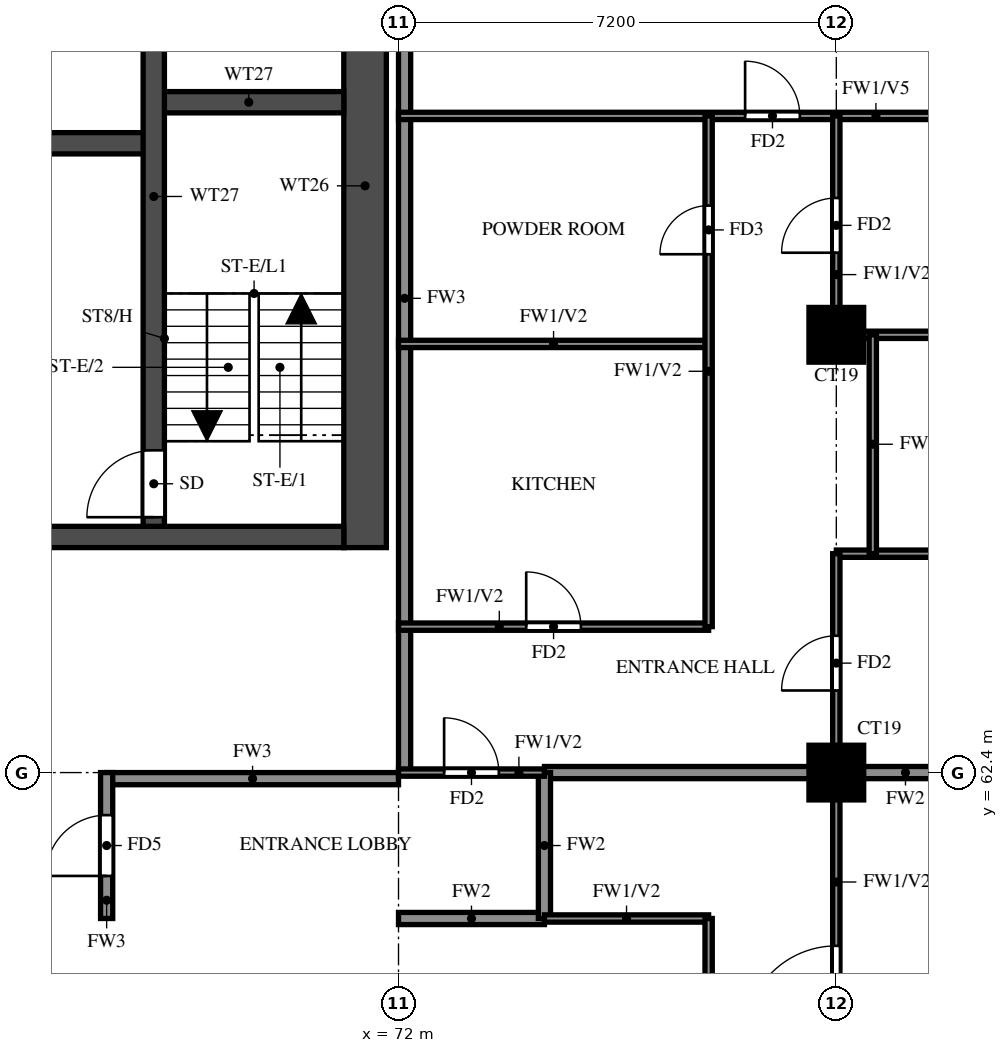
"""IFC4 building model, lengths in metres.
Left out: names, types, materials, properties, quantities, classifications, styles, units other than length and angle.
Written with IfcOpenShell. Run it as: python <this file> out.ifc"""

import sys

from ifc_helpers import new_model, si_unit, direction, frame, frame_2d, origin, origin_2d, place, context, subcontext, project, spatial, rectangle, extrude, source, transform, mapped, element, fill, save


model = new_model("IFC4")
c1 = context("Model", 3, precision=1e-05, world=origin(), true_north=direction((0.0, 1.0)))
c2 = subcontext(c1, "Body", "Model", "MODEL_VIEW")
j1 = project(units=[si_unit("LENGTHUNIT", "METRE"), si_unit("PLANEANGLEUNIT", "RADIAN")], contexts=[c1])
p1 = place(None, origin())
s1 = spatial("IfcSite", under=j1, at=p1, CompositionType="ELEMENT")
p2 = place(p1, origin())
s2 = spatial("IfcBuilding", under=s1, at=p2, CompositionType="ELEMENT")
p3 = place(p2, frame((0.0, 0.0, 199.0)))
s3 = spatial("IfcBuildingStorey", under=s2, at=p3, CompositionType="ELEMENT", Elevation=199.0)
m1 = source(origin(), c2, "Body", "SweptSolid", [
    extrude(rectangle(XDim=0.9, YDim=0.9, at=origin_2d()), origin(), (0.0, 0.0, 1.0), 3.2),
])
for number, where, z_axis, x_axis in (
    (1, (79.2, 62.4, 0.0), (0.0, 0.0, 1.0), (1.0, 0.0, 0.0)),
    (2, (79.2, 69.6, 0.0), (0.0, 0.0, 1.0), (1.0, 0.0, 0.0)),
):
    element("IfcColumn", number, at=place(p3, frame(where, z_axis=z_axis, x_axis=x_axis)), inside=s3, PredefinedType="COLUMN", context=c2, shape_type="MappedRepresentation", body=[
        mapped(m1, transform((0.0, 0.0, 0.0))),
    ])
p4 = place(p3, frame((71.45, 66.1, 0.0), z_axis=(0.0, 0.0, 1.0), x_axis=(0.0, 1.0, 0.0)))
e3 = element("IfcWall", 3, at=p4, inside=s3, PredefinedType="SHEAR", context=c2, shape_type="SweptSolid", body=[
    extrude(rectangle(XDim=11.9, YDim=0.7, at=frame_2d((5.95, 0.0))), origin(), (0.0, 0.0, 1.0), 3.2),
])
p5 = place(p3, frame((29.7, 66.275, 0.0), z_axis=(0.0, 0.0, 1.0), x_axis=(1.0, 0.0, 0.0)))
e4 = element("IfcWall", 4, at=p5, inside=s3, PredefinedType="SHEAR", context=c2, shape_type="SweptSolid", body=[
    extrude(rectangle(XDim=41.4, YDim=0.35, at=frame_2d((20.7, 0.0))), origin(), (0.0, 0.0, 1.0), 3.2),
])
p6 = place(p5, frame((0.925, 0.0, 0.0)))
e5 = element("IfcOpeningElement", 5, at=p6, cuts=e4, PredefinedType="OPENING", context=c2, shape_type="SweptSolid", body=[
    extrude(rectangle(XDim=1.1, YDim=2.1, at=frame_2d((0.55, 1.05))), frame((0.0, 0.185, 0.0), z_axis=(0.0, -1.0, 0.0), x_axis=(1.0, 0.0, 0.0)), (0.0, 0.0, 1.0), 0.37),
])
p7 = place(p5, frame((3.712, 0.0, 0.0)))
e6 = element("IfcOpeningElement", 6, at=p7, cuts=e4, PredefinedType="OPENING", context=c2, shape_type="SweptSolid", body=[
    extrude(rectangle(XDim=1.8, YDim=2.1, at=frame_2d((0.9, 1.05))), frame((0.0, 0.185, 0.0), z_axis=(0.0, -1.0, 0.0), x_axis=(1.0, 0.0, 0.0)), (0.0, 0.0, 1.0), 0.37),
])
p8 = place(p3, frame((32.825, 72.75, 0.0), z_axis=(0.0, 0.0, 1.0), x_axis=(1.0, 0.0, 0.0)))
e7 = element("IfcWall", 7, at=p8, inside=s3, PredefinedType="SHEAR", context=c2, shape_type="SweptSolid", body=[
    extrude(rectangle(XDim=35.15, YDim=0.35, at=frame_2d((17.575, 0.0))), origin(), (0.0, 0.0, 1.0), 3.2),
])
p9 = place(p8, frame((19.8, 0.0, 0.0)))
e8 = element("IfcOpeningElement", 8, at=p9, cuts=e7, PredefinedType="OPENING", context=c2, shape_type="SweptSolid", body=[
    extrude(rectangle(XDim=1.1, YDim=2.1, at=frame_2d((0.55, 1.05))), frame((0.0, 0.185, 0.0), z_axis=(0.0, -1.0, 0.0), x_axis=(1.0, 0.0, 0.0)), (0.0, 0.0, 1.0), 0.37),
])
p10 = place(p8, frame((27.7, 0.0, 0.0)))
e9 = element("IfcOpeningElement", 9, at=p10, cuts=e7, PredefinedType="OPENING", context=c2, shape_type="SweptSolid", body=[
    extrude(rectangle(XDim=1.1, YDim=2.1, at=frame_2d((0.55, 1.05))), frame((0.0, 0.185, 0.0), z_axis=(0.0, -1.0, 0.0), x_axis=(1.0, 0.0, 0.0)), (0.0, 0.0, 1.0), 0.37),
])
p11 = place(p8, frame((30.3, 0.0, 0.0)))
e10 = element("IfcOpeningElement", 10, at=p11, cuts=e7, PredefinedType="OPENING", context=c2, shape_type="SweptSolid", body=[
    extrude(rectangle(XDim=1.1, YDim=2.1, at=frame_2d((0.55, 1.05))), frame((0.0, 0.185, 0.0), z_axis=(0.0, -1.0, 0.0), x_axis=(1.0, 0.0, 0.0)), (0.0, 0.0, 1.0), 0.37),
])
p12 = place(p8, frame((3.8, 0.0, 0.0)))
e11 = element("IfcOpeningElement", 11, at=p12, cuts=e7, PredefinedType="OPENING", context=c2, shape_type="SweptSolid", body=[
    extrude(rectangle(XDim=1.1, YDim=2.1, at=frame_2d((0.55, 1.05))), frame((0.0, 0.185, 0.0), z_axis=(0.0, -1.0, 0.0), x_axis=(1.0, 0.0, 0.0)), (0.0, 0.0, 1.0), 0.37),
])
p13 = place(p8, frame((6.55, 0.0, 0.0)))
e12 = element("IfcOpeningElement", 12, at=p13, cuts=e7, PredefinedType="OPENING", context=c2, shape_type="SweptSolid", body=[
    extrude(rectangle(XDim=1.1, YDim=2.1, at=frame_2d((0.55, 1.05))), frame((0.0, 0.185, 0.0), z_axis=(0.0, -1.0, 0.0), x_axis=(1.0, 0.0, 0.0)), (0.0, 0.0, 1.0), 0.37),
])
p14 = place(p8, frame((9.3, 0.0, 0.0)))
e13 = element("IfcOpeningElement", 13, at=p14, cuts=e7, PredefinedType="OPENING", context=c2, shape_type="SweptSolid", body=[
    extrude(rectangle(XDim=1.1, YDim=2.1, at=frame_2d((0.55, 1.05))), frame((0.0, 0.185, 0.0), z_axis=(0.0, -1.0, 0.0), x_axis=(1.0, 0.0, 0.0)), (0.0, 0.0, 1.0), 0.37),
])
p15 = place(p8, frame((12.05, 0.0, 0.0)))
e14 = element("IfcOpeningElement", 14, at=p15, cuts=e7, PredefinedType="OPENING", context=c2, shape_type="SweptSolid", body=[
    extrude(rectangle(XDim=1.1, YDim=2.1, at=frame_2d((0.55, 1.05))), frame((0.0, 0.185, 0.0), z_axis=(0.0, -1.0, 0.0), x_axis=(1.0, 0.0, 0.0)), (0.0, 0.0, 1.0), 0.37),
])
p16 = place(p8, frame((14.8, 0.0, 0.0)))
e15 = element("IfcOpeningElement", 15, at=p16, cuts=e7, PredefinedType="OPENING", context=c2, shape_type="SweptSolid", body=[
    extrude(rectangle(XDim=1.1, YDim=2.1, at=frame_2d((0.55, 1.05))), frame((0.0, 0.185, 0.0), z_axis=(0.0, -1.0, 0.0), x_axis=(1.0, 0.0, 0.0)), (0.0, 0.0, 1.0), 0.37),
])
p17 = place(p8, frame((17.55, 0.0, 0.0)))
e16 = element("IfcOpeningElement", 16, at=p17, cuts=e7, PredefinedType="OPENING", context=c2, shape_type="SweptSolid", body=[
    extrude(rectangle(XDim=1.1, YDim=2.1, at=frame_2d((0.55, 1.05))), frame((0.0, 0.185, 0.0), z_axis=(0.0, -1.0, 0.0), x_axis=(1.0, 0.0, 0.0)), (0.0, 0.0, 1.0), 0.37),
])
p18 = place(p8, frame((0.938, 0.0, 0.0)))
e17 = element("IfcOpeningElement", 17, at=p18, cuts=e7, PredefinedType="OPENING", context=c2, shape_type="SweptSolid", body=[
    extrude(rectangle(XDim=1.1, YDim=2.1, at=frame_2d((0.55, 1.05))), frame((0.0, 0.185, 0.0), z_axis=(0.0, -1.0, 0.0), x_axis=(1.0, 0.0, 0.0)), (0.0, 0.0, 1.0), 0.37),
])
p19 = place(p3, frame((67.975, 73.425, 0.0), z_axis=(0.0, 0.0, 1.0), x_axis=(1.0, 0.0, 0.0)))
e18 = element("IfcWall", 18, at=p19, inside=s3, PredefinedType="SHEAR", context=c2, shape_type="SweptSolid", body=[
    extrude(rectangle(XDim=3.125, YDim=0.35, at=frame_2d((1.562, 0.0))), origin(), (0.0, 0.0, 1.0), 3.2),
])
p20 = place(p3, frame((67.975, 66.45, 0.0), z_axis=(0.0, 0.0, 1.0), x_axis=(0.0, 1.0, 0.0)))
e19 = element("IfcWall", 19, at=p20, inside=s3, PredefinedType="SHEAR", context=c2, shape_type="SweptSolid", body=[
    extrude(rectangle(XDim=10.85, YDim=0.35, at=frame_2d((5.425, 0.0))), origin(), (0.0, 0.0, 1.0), 3.2),
])
p21 = place(p20, frame((0.15, 0.0, 0.0)))
e20 = element("IfcOpeningElement", 20, at=p21, cuts=e19, PredefinedType="OPENING", context=c2, shape_type="SweptSolid", body=[
    extrude(rectangle(XDim=1.1, YDim=2.1, at=frame_2d((0.55, 1.05))), frame((0.0, 0.185, 0.0), z_axis=(0.0, -1.0, 0.0), x_axis=(1.0, 0.0, 0.0)), (0.0, 0.0, 1.0), 0.37),
])
p22 = place(p3, frame((67.2, 62.3, 0.0), z_axis=(0.0, 0.0, 1.0), x_axis=(1.0, 0.0, 0.0)))
e21 = element("IfcWall", 21, at=p22, inside=s3, PredefinedType="SOLIDWALL", context=c2, shape_type="SweptSolid", body=[
    extrude(rectangle(XDim=4.8, YDim=0.2, at=frame_2d((2.4, 0.0))), origin(), (0.0, 0.0, 1.0), 3.2),
])
p23 = place(p3, frame((67.2, 60.0, 0.0), z_axis=(0.0, 0.0, 1.0), x_axis=(0.0, 1.0, 0.0)))
e22 = element("IfcWall", 22, at=p23, inside=s3, PredefinedType="SOLIDWALL", context=c2, shape_type="SweptSolid", body=[
    extrude(rectangle(XDim=2.4, YDim=0.2, at=frame_2d((1.2, 0.0))), origin(), (0.0, 0.0, 1.0), 3.2),
])
p24 = place(p23, frame((0.7, 0.0, 0.0)))
e23 = element("IfcOpeningElement", 23, at=p24, cuts=e22, PredefinedType="OPENING", context=c2, shape_type="SweptSolid", body=[
    extrude(rectangle(XDim=1.0, YDim=2.1, at=frame_2d((0.5, 1.05))), frame((0.0, 0.11, 0.0), z_axis=(0.0, -1.0, 0.0), x_axis=(1.0, 0.0, 0.0)), (0.0, 0.0, 1.0), 0.22),
])
p25 = place(p3, frame((72.1, 62.4, 0.0), z_axis=(0.0, 0.0, 1.0), x_axis=(0.0, 1.0, 0.0)))
e24 = element("IfcWall", 24, at=p25, inside=s3, PredefinedType="SOLIDWALL", context=c2, shape_type="SweptSolid", body=[
    extrude(rectangle(XDim=15.6, YDim=0.2, at=frame_2d((7.8, 0.0))), origin(), (0.0, 0.0, 1.0), 3.2),
])
p26 = place(p3, frame((72.0, 60.0, 0.0), z_axis=(0.0, 0.0, 1.0), x_axis=(1.0, 0.0, 0.0)))
e25 = element("IfcWall", 25, at=p26, inside=s3, PredefinedType="SOLIDWALL", context=c2, shape_type="SweptSolid", body=[
    extrude(rectangle(XDim=2.4, YDim=0.2, at=frame_2d((1.2, 0.0))), origin(), (0.0, 0.0, 1.0), 3.2),
])
p27 = place(p3, frame((74.4, 62.4, 0.0), z_axis=(0.0, 0.0, 1.0), x_axis=(1.0, 0.0, 0.0)))
e26 = element("IfcWall", 26, at=p27, inside=s3, PredefinedType="SOLIDWALL", context=c2, shape_type="SweptSolid", body=[
    extrude(rectangle(XDim=11.875, YDim=0.2, at=frame_2d((5.938, 0.0))), origin(), (0.0, 0.0, 1.0), 3.2),
])
p28 = place(p3, frame((74.4, 60.0, 0.0), z_axis=(0.0, 0.0, 1.0), x_axis=(0.0, 1.0, 0.0)))
e27 = element("IfcWall", 27, at=p28, inside=s3, PredefinedType="SOLIDWALL", context=c2, shape_type="SweptSolid", body=[
    extrude(rectangle(XDim=2.4, YDim=0.2, at=frame_2d((1.2, 0.0))), origin(), (0.0, 0.0, 1.0), 3.2),
])
p29 = place(p3, frame((74.4, 60.0, 0.0), z_axis=(0.0, 0.0, 1.0), x_axis=(1.0, 0.0, 0.0)))
e28 = element("IfcWall", 28, at=p29, inside=s3, PredefinedType="PARTITIONING", context=c2, shape_type="SweptSolid", body=[
    extrude(rectangle(XDim=2.7, YDim=0.12, at=frame_2d((1.35, 0.0))), origin(), (0.0, 0.0, 1.0), 3.2),
])
p30 = place(p3, frame((72.0, 62.4, 0.0), z_axis=(0.0, 0.0, 1.0), x_axis=(1.0, 0.0, 0.0)))
e29 = element("IfcWall", 29, at=p30, inside=s3, PredefinedType="PARTITIONING", context=c2, shape_type="SweptSolid", body=[
    extrude(rectangle(XDim=2.4, YDim=0.12, at=frame_2d((1.2, 0.0))), origin(), (0.0, 0.0, 1.0), 3.2),
])
p31 = place(p30, frame((0.75, 0.0, 0.0)))
e30 = element("IfcOpeningElement", 30, at=p31, cuts=e29, PredefinedType="OPENING", context=c2, shape_type="SweptSolid", body=[
    extrude(rectangle(XDim=0.9, YDim=2.1, at=frame_2d((0.45, 1.05))), frame((0.0, 0.07, 0.0), z_axis=(0.0, -1.0, 0.0), x_axis=(1.0, 0.0, 0.0)), (0.0, 0.0, 1.0), 0.14),
])
p32 = place(p3, frame((72.0, 64.8, 0.0), z_axis=(0.0, 0.0, 1.0), x_axis=(1.0, 0.0, 0.0)))
e31 = element("IfcWall", 31, at=p32, inside=s3, PredefinedType="PARTITIONING", context=c2, shape_type="SweptSolid", body=[
    extrude(rectangle(XDim=5.1, YDim=0.12, at=frame_2d((2.55, 0.0))), origin(), (0.0, 0.0, 1.0), 3.2),
])
p33 = place(p32, frame((2.1, 0.0, 0.0)))
e32 = element("IfcOpeningElement", 32, at=p33, cuts=e31, PredefinedType="OPENING", context=c2, shape_type="SweptSolid", body=[
    extrude(rectangle(XDim=0.9, YDim=2.1, at=frame_2d((0.45, 1.05))), frame((0.0, 0.07, 0.0), z_axis=(0.0, -1.0, 0.0), x_axis=(1.0, 0.0, 0.0)), (0.0, 0.0, 1.0), 0.14),
])
p34 = place(p3, frame((79.2, 66.0, 0.0), z_axis=(0.0, 0.0, 1.0), x_axis=(1.0, 0.0, 0.0)))
e33 = element("IfcWall", 33, at=p34, inside=s3, PredefinedType="PARTITIONING", context=c2, shape_type="SweptSolid", body=[
    extrude(rectangle(XDim=7.075, YDim=0.12, at=frame_2d((3.538, 0.0))), origin(), (0.0, 0.0, 1.0), 2.3),
])
p35 = place(p34, frame((3.438, 0.0, 0.0)))
e34 = element("IfcOpeningElement", 34, at=p35, cuts=e33, PredefinedType="OPENING", context=c2, shape_type="SweptSolid", body=[
    extrude(rectangle(XDim=0.8, YDim=2.1, at=frame_2d((0.4, 1.05))), frame((0.0, 0.07, 0.0), z_axis=(0.0, -1.0, 0.0), x_axis=(1.0, 0.0, 0.0)), (0.0, 0.0, 1.0), 0.14),
])
p36 = place(p3, frame((72.0, 69.45, 0.0), z_axis=(0.0, 0.0, 1.0), x_axis=(1.0, 0.0, 0.0)))
e35 = element("IfcWall", 35, at=p36, inside=s3, PredefinedType="PARTITIONING", context=c2, shape_type="SweptSolid", body=[
    extrude(rectangle(XDim=5.1, YDim=0.12, at=frame_2d((2.55, 0.0))), origin(), (0.0, 0.0, 1.0), 3.2),
])
p37 = place(p3, frame((79.2, 69.6, 0.0), z_axis=(0.0, 0.0, 1.0), x_axis=(1.0, 0.0, 0.0)))
e36 = element("IfcWall", 36, at=p37, inside=s3, PredefinedType="PARTITIONING", context=c2, shape_type="SweptSolid", body=[
    extrude(rectangle(XDim=7.075, YDim=0.12, at=frame_2d((3.538, 0.0))), origin(), (0.0, 0.0, 1.0), 3.2),
])
p38 = place(p3, frame((72.0, 73.2, 0.0), z_axis=(0.0, 0.0, 1.0), x_axis=(1.0, 0.0, 0.0)))
e37 = element("IfcWall", 37, at=p38, inside=s3, PredefinedType="PARTITIONING", context=c2, shape_type="SweptSolid", body=[
    extrude(rectangle(XDim=14.275, YDim=0.12, at=frame_2d((7.137, 0.0))), origin(), (0.0, 0.0, 1.0), 2.3),
])
p39 = place(p38, frame((5.7, 0.0, 0.0)))
e38 = element("IfcOpeningElement", 38, at=p39, cuts=e37, PredefinedType="OPENING", context=c2, shape_type="SweptSolid", body=[
    extrude(rectangle(XDim=0.9, YDim=2.1, at=frame_2d((0.45, 1.05))), frame((0.0, 0.07, 0.0), z_axis=(0.0, -1.0, 0.0), x_axis=(1.0, 0.0, 0.0)), (0.0, 0.0, 1.0), 0.14),
])
p40 = place(p3, frame((77.1, 56.4, 0.0), z_axis=(0.0, 0.0, 1.0), x_axis=(0.0, 1.0, 0.0)))
e39 = element("IfcWall", 39, at=p40, inside=s3, PredefinedType="PARTITIONING", context=c2, shape_type="SweptSolid", body=[
    extrude(rectangle(XDim=3.6, YDim=0.12, at=frame_2d((1.8, 0.0))), origin(), (0.0, 0.0, 1.0), 3.2),
])
p41 = place(p3, frame((77.1, 64.8, 0.0), z_axis=(0.0, 0.0, 1.0), x_axis=(0.0, 1.0, 0.0)))
e40 = element("IfcWall", 40, at=p41, inside=s3, PredefinedType="PARTITIONING", context=c2, shape_type="SweptSolid", body=[
    extrude(rectangle(XDim=8.4, YDim=0.12, at=frame_2d((4.2, 0.0))), origin(), (0.0, 0.0, 1.0), 3.2),
])
p42 = place(p41, frame((6.125, 0.0, 0.0)))
e41 = element("IfcOpeningElement", 41, at=p42, cuts=e40, PredefinedType="OPENING", context=c2, shape_type="SweptSolid", body=[
    extrude(rectangle(XDim=0.8, YDim=2.1, at=frame_2d((0.4, 1.05))), frame((0.0, 0.07, 0.0), z_axis=(0.0, -1.0, 0.0), x_axis=(1.0, 0.0, 0.0)), (0.0, 0.0, 1.0), 0.14),
])
p43 = place(p3, frame((79.2, 55.2, 0.0), z_axis=(0.0, 0.0, 1.0), x_axis=(0.0, 1.0, 0.0)))
e42 = element("IfcWall", 42, at=p43, inside=s3, PredefinedType="PARTITIONING", context=c2, shape_type="SweptSolid", body=[
    extrude(rectangle(XDim=10.8, YDim=0.12, at=frame_2d((5.4, 0.0))), origin(), (0.0, 0.0, 1.0), 3.2),
])
p44 = place(p43, frame((2.85, 0.0, 0.0)))
e43 = element("IfcOpeningElement", 43, at=p44, cuts=e42, PredefinedType="OPENING", context=c2, shape_type="SweptSolid", body=[
    extrude(rectangle(XDim=1.5, YDim=2.1, at=frame_2d((0.75, 1.05))), frame((0.0, 0.07, 0.0), z_axis=(0.0, -1.0, 0.0), x_axis=(1.0, 0.0, 0.0)), (0.0, 0.0, 1.0), 0.14),
])
p45 = place(p43, frame((8.55, 0.0, 0.0)))
e44 = element("IfcOpeningElement", 44, at=p45, cuts=e42, PredefinedType="OPENING", context=c2, shape_type="SweptSolid", body=[
    extrude(rectangle(XDim=0.9, YDim=2.1, at=frame_2d((0.45, 1.05))), frame((0.0, 0.07, 0.0), z_axis=(0.0, -1.0, 0.0), x_axis=(1.0, 0.0, 0.0)), (0.0, 0.0, 1.0), 0.14),
])
p46 = place(p3, frame((79.2, 69.6, 0.0), z_axis=(0.0, 0.0, 1.0), x_axis=(0.0, 1.0, 0.0)))
e45 = element("IfcWall", 45, at=p46, inside=s3, PredefinedType="PARTITIONING", context=c2, shape_type="SweptSolid", body=[
    extrude(rectangle(XDim=3.6, YDim=0.12, at=frame_2d((1.8, 0.0))), origin(), (0.0, 0.0, 1.0), 3.2),
])
p47 = place(p46, frame((1.35, 0.0, 0.0)))
e46 = element("IfcOpeningElement", 46, at=p47, cuts=e45, PredefinedType="OPENING", context=c2, shape_type="SweptSolid", body=[
    extrude(rectangle(XDim=0.9, YDim=2.1, at=frame_2d((0.45, 1.05))), frame((0.0, 0.07, 0.0), z_axis=(0.0, -1.0, 0.0), x_axis=(1.0, 0.0, 0.0)), (0.0, 0.0, 1.0), 0.14),
])
p48 = place(p3, frame((79.8, 66.0, 0.0), z_axis=(0.0, 0.0, 1.0), x_axis=(0.0, 1.0, 0.0)))
e47 = element("IfcWall", 47, at=p48, inside=s3, PredefinedType="PARTITIONING", context=c2, shape_type="SweptSolid", body=[
    extrude(rectangle(XDim=3.6, YDim=0.12, at=frame_2d((1.8, 0.0))), origin(), (0.0, 0.0, 1.0), 3.2),
])
p49 = place(p21, origin())
e48 = element("IfcDoor", 48, at=p49, inside=s3, OperationType="SINGLE_SWING_LEFT", PredefinedType="DOOR", context=c2, shape_type="SweptSolid", body=[
    extrude(rectangle(XDim=1.1, YDim=2.1, at=frame_2d((0.55, 1.05))), frame((0.0, 0.025, 0.0), z_axis=(0.0, -1.0, 0.0), x_axis=(1.0, 0.0, 0.0)), (0.0, 0.0, 1.0), 0.05),
])
fill(e20, e48)
p50 = place(p44, origin())
e49 = element("IfcDoor", 49, at=p50, inside=s3, OperationType="SINGLE_SWING_LEFT", PredefinedType="DOOR", context=c2, shape_type="SweptSolid", body=[
    extrude(rectangle(XDim=1.5, YDim=2.1, at=frame_2d((0.75, 1.05))), frame((0.0, 0.025, 0.0), z_axis=(0.0, -1.0, 0.0), x_axis=(1.0, 0.0, 0.0)), (0.0, 0.0, 1.0), 0.05),
])
fill(e43, e49)
p51 = place(p31, origin())
e50 = element("IfcDoor", 50, at=p51, inside=s3, OperationType="SINGLE_SWING_RIGHT", PredefinedType="DOOR", context=c2, shape_type="SweptSolid", body=[
    extrude(rectangle(XDim=0.9, YDim=2.1, at=frame_2d((0.45, 1.05))), frame((0.0, 0.025, 0.0), z_axis=(0.0, -1.0, 0.0), x_axis=(1.0, 0.0, 0.0)), (0.0, 0.0, 1.0), 0.05),
])
fill(e30, e50)
p52 = place(p24, origin())
e51 = element("IfcDoor", 51, at=p52, inside=s3, OperationType="SINGLE_SWING_LEFT", PredefinedType="DOOR", context=c2, shape_type="SweptSolid", body=[
    extrude(rectangle(XDim=1.0, YDim=2.1, at=frame_2d((0.5, 1.05))), frame((0.0, 0.025, 0.0), z_axis=(0.0, -1.0, 0.0), x_axis=(1.0, 0.0, 0.0)), (0.0, 0.0, 1.0), 0.05),
])
fill(e23, e51)
p53 = place(p45, origin())
e52 = element("IfcDoor", 52, at=p53, inside=s3, OperationType="SINGLE_SWING_LEFT", PredefinedType="DOOR", context=c2, shape_type="SweptSolid", body=[
    extrude(rectangle(XDim=0.9, YDim=2.1, at=frame_2d((0.45, 1.05))), frame((0.0, 0.025, 0.0), z_axis=(0.0, -1.0, 0.0), x_axis=(1.0, 0.0, 0.0)), (0.0, 0.0, 1.0), 0.05),
])
fill(e44, e52)
p54 = place(p47, origin())
e53 = element("IfcDoor", 53, at=p54, inside=s3, OperationType="SINGLE_SWING_LEFT", PredefinedType="DOOR", context=c2, shape_type="SweptSolid", body=[
    extrude(rectangle(XDim=0.9, YDim=2.1, at=frame_2d((0.45, 1.05))), frame((0.0, 0.025, 0.0), z_axis=(0.0, -1.0, 0.0), x_axis=(1.0, 0.0, 0.0)), (0.0, 0.0, 1.0), 0.05),
])
fill(e46, e53)
p55 = place(p39, origin())
e54 = element("IfcDoor", 54, at=p55, inside=s3, OperationType="SINGLE_SWING_LEFT", PredefinedType="DOOR", context=c2, shape_type="SweptSolid", body=[
    extrude(rectangle(XDim=0.9, YDim=2.1, at=frame_2d((0.45, 1.05))), frame((0.0, 0.025, 0.0), z_axis=(0.0, -1.0, 0.0), x_axis=(1.0, 0.0, 0.0)), (0.0, 0.0, 1.0), 0.05),
])
fill(e38, e54)
p56 = place(p33, origin())
e55 = element("IfcDoor", 55, at=p56, inside=s3, OperationType="SINGLE_SWING_RIGHT", PredefinedType="DOOR", context=c2, shape_type="SweptSolid", body=[
    extrude(rectangle(XDim=0.9, YDim=2.1, at=frame_2d((0.45, 1.05))), frame((0.0, 0.025, 0.0), z_axis=(0.0, -1.0, 0.0), x_axis=(1.0, 0.0, 0.0)), (0.0, 0.0, 1.0), 0.05),
])
fill(e32, e55)
p57 = place(p42, origin())
e56 = element("IfcDoor", 56, at=p57, inside=s3, OperationType="SINGLE_SWING_LEFT", PredefinedType="DOOR", context=c2, shape_type="SweptSolid", body=[
    extrude(rectangle(XDim=0.8, YDim=2.1, at=frame_2d((0.4, 1.05))), frame((0.0, 0.025, 0.0), z_axis=(0.0, -1.0, 0.0), x_axis=(1.0, 0.0, 0.0)), (0.0, 0.0, 1.0), 0.05),
])
fill(e41, e56)
save(model, sys.argv[1])
